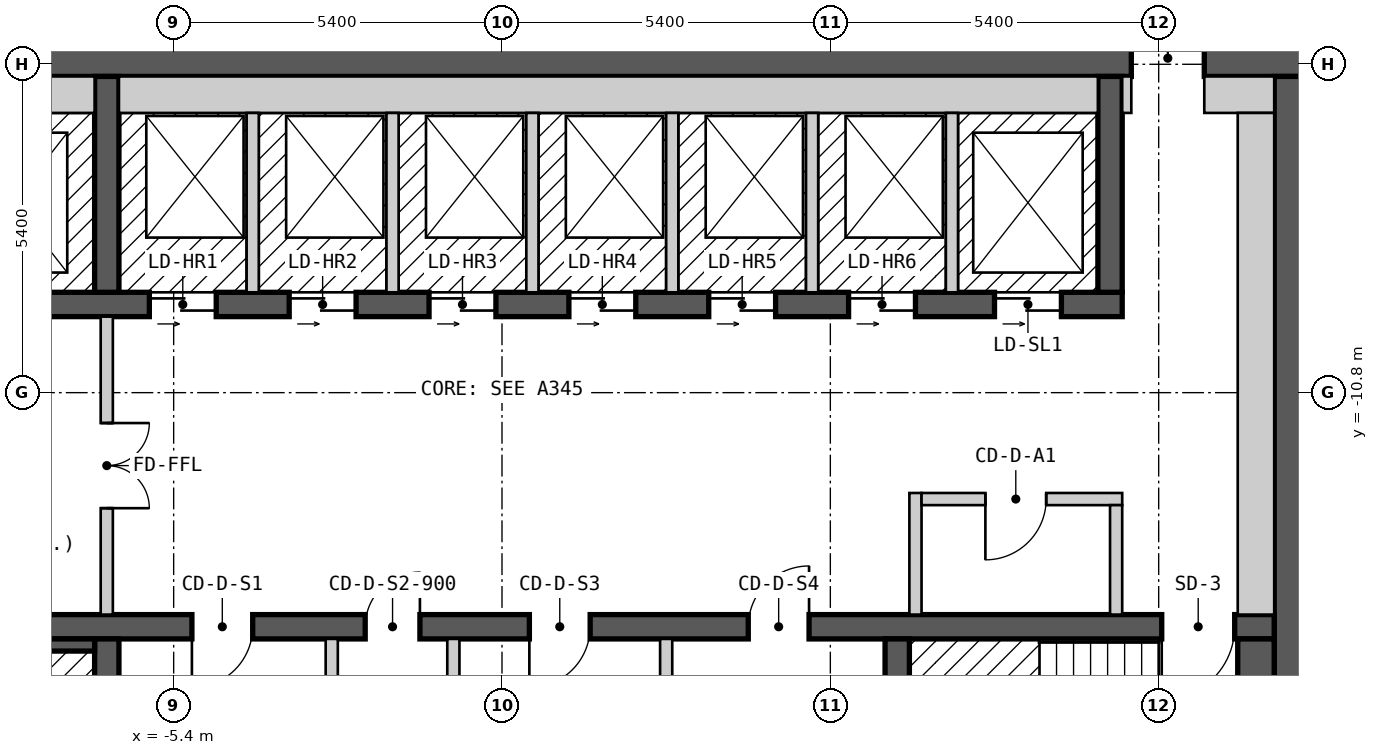
"""IFC4 building model, lengths in metres.
Left out: names, types, materials, properties, quantities, classifications, styles, units other than length and angle.
Written with IfcOpenShell. Run it as: python <this file> out.ifc"""

import sys

from ifc_helpers import new_model, si_unit, direction, frame, frame_2d, origin, place, context, subcontext, project, spatial, rectangle, extrude, element, fill, save


model = new_model("IFC4")
c1 = context("Model", 3, precision=1e-05, world=origin(), true_north=direction((0.0, 1.0)))
c2 = subcontext(c1, "Body", "Model", "MODEL_VIEW")
j1 = project(units=[si_unit("LENGTHUNIT", "METRE"), si_unit("PLANEANGLEUNIT", "RADIAN")], contexts=[c1])
p1 = place(None, origin())
s1 = spatial("IfcSite", under=j1, at=p1, CompositionType="ELEMENT")
p2 = place(p1, origin())
s2 = spatial("IfcBuilding", under=s1, at=p2, CompositionType="ELEMENT")
p3 = place(p2, frame((0.0, 0.0, 166.2)))
s3 = spatial("IfcBuildingStorey", under=s2, at=p3, CompositionType="ELEMENT", Elevation=166.2)
p4 = place(p3, frame((-13.3, -5.3, 0.0), z_axis=(0.0, 0.0, 1.0), x_axis=(1.0, 0.0, 0.0)))
e1 = element("IfcWall", 1, at=p4, inside=s3, PredefinedType="SHEAR", context=c2, shape_type="SweptSolid", body=[
    extrude(rectangle(XDim=26.6, YDim=0.6, at=frame_2d((13.3, 0.0))), origin(), (0.0, 0.0, 1.0), 2.7),
])
p5 = place(p4, frame((23.65, 0.0, 0.0)))
e2 = element("IfcOpeningElement", 2, at=p5, cuts=e1, PredefinedType="OPENING", context=c2, shape_type="SweptSolid", body=[
    extrude(rectangle(XDim=1.2, YDim=2.1, at=frame_2d((0.6, 1.05))), frame((0.0, 0.31, 0.0), z_axis=(0.0, -1.0, 0.0), x_axis=(1.0, 0.0, 0.0)), (0.0, 0.0, 1.0), 0.62),
])
p6 = place(p3, frame((13.0, -18.4, 0.0), z_axis=(0.0, 0.0, 1.0), x_axis=(0.0, 1.0, 0.0)))
e3 = element("IfcWall", 3, at=p6, inside=s3, PredefinedType="SHEAR", context=c2, shape_type="SweptSolid", body=[
    extrude(rectangle(XDim=12.8, YDim=0.6, at=frame_2d((6.4, 0.0))), origin(), (0.0, 0.0, 1.0), 2.7),
])
p7 = place(p3, frame((-12.7, -14.65, 0.0), z_axis=(0.0, 0.0, 1.0), x_axis=(1.0, 0.0, 0.0)))
e4 = element("IfcWall", 4, at=p7, inside=s3, PredefinedType="SHEAR", context=c2, shape_type="SweptSolid", body=[
    extrude(rectangle(XDim=25.4, YDim=0.4, at=frame_2d((12.7, 0.0))), origin(), (0.0, 0.0, 1.0), 2.7),
])
p8 = place(p7, frame((1.9, 0.0, 0.0), z_axis=(0.0, 0.0, 1.0), x_axis=(-1.0, 0.0, 0.0)))
e5 = element("IfcOpeningElement", 5, at=p8, cuts=e4, PredefinedType="OPENING", context=c2, shape_type="SweptSolid", body=[
    extrude(rectangle(XDim=1.2, YDim=2.1, at=frame_2d((0.6, 1.05))), frame((0.0, 0.21, 0.0), z_axis=(0.0, -1.0, 0.0), x_axis=(1.0, 0.0, 0.0)), (0.0, 0.0, 1.0), 0.42),
])
p9 = place(p7, frame((24.75, 0.0, 0.0), z_axis=(0.0, 0.0, 1.0), x_axis=(-1.0, 0.0, 0.0)))
e6 = element("IfcOpeningElement", 6, at=p9, cuts=e4, PredefinedType="OPENING", context=c2, shape_type="SweptSolid", body=[
    extrude(rectangle(XDim=1.2, YDim=2.1, at=frame_2d((0.6, 1.05))), frame((0.0, 0.21, 0.0), z_axis=(0.0, -1.0, 0.0), x_axis=(1.0, 0.0, 0.0)), (0.0, 0.0, 1.0), 0.42),
])
p10 = place(p7, frame((8.6, 0.0, 0.0), z_axis=(0.0, 0.0, 1.0), x_axis=(-1.0, 0.0, 0.0)))
e7 = element("IfcOpeningElement", 7, at=p10, cuts=e4, PredefinedType="OPENING", context=c2, shape_type="SweptSolid", body=[
    extrude(rectangle(XDim=1.0, YDim=2.1, at=frame_2d((0.5, 1.05))), frame((0.0, 0.21, 0.0), z_axis=(0.0, -1.0, 0.0), x_axis=(1.0, 0.0, 0.0)), (0.0, 0.0, 1.0), 0.42),
])
p11 = place(p7, frame((11.35, 0.0, 0.0), z_axis=(0.0, 0.0, 1.0), x_axis=(-1.0, 0.0, 0.0)))
e8 = element("IfcOpeningElement", 8, at=p11, cuts=e4, PredefinedType="OPENING", context=c2, shape_type="SweptSolid", body=[
    extrude(rectangle(XDim=0.9, YDim=2.1, at=frame_2d((0.45, 1.05))), frame((0.0, 0.21, 0.0), z_axis=(0.0, -1.0, 0.0), x_axis=(1.0, 0.0, 0.0)), (0.0, 0.0, 1.0), 0.42),
])
p12 = place(p7, frame((14.15, 0.0, 0.0), z_axis=(0.0, 0.0, 1.0), x_axis=(-1.0, 0.0, 0.0)))
e9 = element("IfcOpeningElement", 9, at=p12, cuts=e4, PredefinedType="OPENING", context=c2, shape_type="SweptSolid", body=[
    extrude(rectangle(XDim=1.0, YDim=2.1, at=frame_2d((0.5, 1.05))), frame((0.0, 0.21, 0.0), z_axis=(0.0, -1.0, 0.0), x_axis=(1.0, 0.0, 0.0)), (0.0, 0.0, 1.0), 0.42),
])
p13 = place(p7, frame((17.75, 0.0, 0.0), z_axis=(0.0, 0.0, 1.0), x_axis=(-1.0, 0.0, 0.0)))
e10 = element("IfcOpeningElement", 10, at=p13, cuts=e4, PredefinedType="OPENING", context=c2, shape_type="SweptSolid", body=[
    extrude(rectangle(XDim=1.0, YDim=2.1, at=frame_2d((0.5, 1.05))), frame((0.0, 0.21, 0.0), z_axis=(0.0, -1.0, 0.0), x_axis=(1.0, 0.0, 0.0)), (0.0, 0.0, 1.0), 0.42),
])
p14 = place(p3, frame((-12.7, -9.35, 0.0), z_axis=(0.0, 0.0, 1.0), x_axis=(1.0, 0.0, 0.0)))
e11 = element("IfcWall", 11, at=p14, inside=s3, PredefinedType="SHEAR", context=c2, shape_type="SweptSolid", body=[
    extrude(rectangle(XDim=22.9, YDim=0.4, at=frame_2d((11.45, 0.0))), origin(), (0.0, 0.0, 1.0), 2.7),
])
p15 = place(p14, frame((1.3, 0.0, 0.0)))
e12 = element("IfcOpeningElement", 12, at=p15, cuts=e11, PredefinedType="OPENING", context=c2, shape_type="SweptSolid", body=[
    extrude(rectangle(XDim=1.1, YDim=2.1, at=frame_2d((0.55, 1.05))), frame((0.0, 0.21, 0.0), z_axis=(0.0, -1.0, 0.0), x_axis=(1.0, 0.0, 0.0)), (0.0, 0.0, 1.0), 0.42),
])
p16 = place(p14, frame((4.1, 0.0, 0.0)))
e13 = element("IfcOpeningElement", 13, at=p16, cuts=e11, PredefinedType="OPENING", context=c2, shape_type="SweptSolid", body=[
    extrude(rectangle(XDim=1.1, YDim=2.1, at=frame_2d((0.55, 1.05))), frame((0.0, 0.21, 0.0), z_axis=(0.0, -1.0, 0.0), x_axis=(1.0, 0.0, 0.0)), (0.0, 0.0, 1.0), 0.42),
])
p17 = place(p14, frame((6.9, 0.0, 0.0)))
e14 = element("IfcOpeningElement", 14, at=p17, cuts=e11, PredefinedType="OPENING", context=c2, shape_type="SweptSolid", body=[
    extrude(rectangle(XDim=1.1, YDim=2.1, at=frame_2d((0.55, 1.05))), frame((0.0, 0.21, 0.0), z_axis=(0.0, -1.0, 0.0), x_axis=(1.0, 0.0, 0.0)), (0.0, 0.0, 1.0), 0.42),
])
p18 = place(p14, frame((9.2, 0.0, 0.0)))
e15 = element("IfcOpeningElement", 15, at=p18, cuts=e11, PredefinedType="OPENING", context=c2, shape_type="SweptSolid", body=[
    extrude(rectangle(XDim=1.1, YDim=2.1, at=frame_2d((0.55, 1.05))), frame((0.0, 0.21, 0.0), z_axis=(0.0, -1.0, 0.0), x_axis=(1.0, 0.0, 0.0)), (0.0, 0.0, 1.0), 0.42),
])
p19 = place(p14, frame((11.5, 0.0, 0.0)))
e16 = element("IfcOpeningElement", 16, at=p19, cuts=e11, PredefinedType="OPENING", context=c2, shape_type="SweptSolid", body=[
    extrude(rectangle(XDim=1.1, YDim=2.1, at=frame_2d((0.55, 1.05))), frame((0.0, 0.21, 0.0), z_axis=(0.0, -1.0, 0.0), x_axis=(1.0, 0.0, 0.0)), (0.0, 0.0, 1.0), 0.42),
])
p20 = place(p14, frame((13.8, 0.0, 0.0)))
e17 = element("IfcOpeningElement", 17, at=p20, cuts=e11, PredefinedType="OPENING", context=c2, shape_type="SweptSolid", body=[
    extrude(rectangle(XDim=1.1, YDim=2.1, at=frame_2d((0.55, 1.05))), frame((0.0, 0.21, 0.0), z_axis=(0.0, -1.0, 0.0), x_axis=(1.0, 0.0, 0.0)), (0.0, 0.0, 1.0), 0.42),
])
p21 = place(p14, frame((16.1, 0.0, 0.0)))
e18 = element("IfcOpeningElement", 18, at=p21, cuts=e11, PredefinedType="OPENING", context=c2, shape_type="SweptSolid", body=[
    extrude(rectangle(XDim=1.1, YDim=2.1, at=frame_2d((0.55, 1.05))), frame((0.0, 0.21, 0.0), z_axis=(0.0, -1.0, 0.0), x_axis=(1.0, 0.0, 0.0)), (0.0, 0.0, 1.0), 0.42),
])
p22 = place(p14, frame((18.4, 0.0, 0.0)))
e19 = element("IfcOpeningElement", 19, at=p22, cuts=e11, PredefinedType="OPENING", context=c2, shape_type="SweptSolid", body=[
    extrude(rectangle(XDim=1.1, YDim=2.1, at=frame_2d((0.55, 1.05))), frame((0.0, 0.21, 0.0), z_axis=(0.0, -1.0, 0.0), x_axis=(1.0, 0.0, 0.0)), (0.0, 0.0, 1.0), 0.42),
])
p23 = place(p14, frame((20.8, 0.0, 0.0)))
e20 = element("IfcOpeningElement", 20, at=p23, cuts=e11, PredefinedType="OPENING", context=c2, shape_type="SweptSolid", body=[
    extrude(rectangle(XDim=1.1, YDim=2.1, at=frame_2d((0.55, 1.05))), frame((0.0, 0.21, 0.0), z_axis=(0.0, -1.0, 0.0), x_axis=(1.0, 0.0, 0.0)), (0.0, 0.0, 1.0), 0.42),
])
for number, where, z_axis, x_axis in (
    (21, (-6.5, -18.4, 0.0), (0.0, 0.0, 1.0), (0.0, 1.0, 0.0)),
    (22, (6.5, -18.4, 0.0), (0.0, 0.0, 1.0), (0.0, 1.0, 0.0)),
    (23, (-6.5, -9.15, 0.0), (0.0, 0.0, 1.0), (0.0, 1.0, 0.0)),
    (24, (10.0, -9.15, 0.0), (0.0, 0.0, 1.0), (0.0, 1.0, 0.0)),
):
    element("IfcWall", number, at=place(p3, frame(where, z_axis=z_axis, x_axis=x_axis)), inside=s3, PredefinedType="SHEAR", context=c2, shape_type="SweptSolid", body=[
        extrude(rectangle(XDim=3.55, YDim=0.4, at=frame_2d((1.775, 0.0))), origin(), (0.0, 0.0, 1.0), 2.7),
    ])
p24 = place(p3, frame((-12.1, -5.9, 0.0), z_axis=(0.0, 0.0, 1.0), x_axis=(1.0, 0.0, 0.0)))
e25 = element("IfcWall", 25, at=p24, inside=s3, PredefinedType="SOLIDWALL", context=c2, shape_type="SweptSolid", body=[
    extrude(rectangle(XDim=5.4, YDim=0.6, at=frame_2d((2.7, 0.0))), origin(), (0.0, 0.0, 1.0), 2.7),
])
p25 = place(p3, frame((-10.8, -14.95, 0.0), z_axis=(0.0, 0.0, 1.0), x_axis=(1.0, 0.0, 0.0)))
e26 = element("IfcWall", 26, at=p25, inside=s3, PredefinedType="SOLIDWALL", context=c2, shape_type="SweptSolid", body=[
    extrude(rectangle(XDim=4.1, YDim=0.2, at=frame_2d((2.05, 0.0))), origin(), (0.0, 0.0, 1.0), 2.7),
])
p26 = place(p3, frame((-6.5, -14.45, 0.0), z_axis=(0.0, 0.0, 1.0), x_axis=(0.0, 1.0, 0.0)))
e27 = element("IfcWall", 27, at=p26, inside=s3, PredefinedType="PARTITIONING", context=c2, shape_type="SweptSolid", body=[
    extrude(rectangle(XDim=4.9, YDim=0.2, at=frame_2d((2.45, 0.0))), origin(), (0.0, 0.0, 1.0), 2.7),
])
p27 = place(p26, frame((3.15, 0.0, 0.0), z_axis=(0.0, 0.0, 1.0), x_axis=(-1.0, 0.0, 0.0)))
e28 = element("IfcOpeningElement", 28, at=p27, cuts=e27, PredefinedType="OPENING", context=c2, shape_type="SweptSolid", body=[
    extrude(rectangle(XDim=1.4, YDim=2.1, at=frame_2d((0.7, 1.05))), frame((0.0, 0.11, 0.0), z_axis=(0.0, -1.0, 0.0), x_axis=(1.0, 0.0, 0.0)), (0.0, 0.0, 1.0), 0.22),
])
p28 = place(p3, frame((-6.3, -5.9, 0.0), z_axis=(0.0, 0.0, 1.0), x_axis=(1.0, 0.0, 0.0)))
e29 = element("IfcWall", 29, at=p28, inside=s3, PredefinedType="SOLIDWALL", context=c2, shape_type="SweptSolid", body=[
    extrude(rectangle(XDim=16.1, YDim=0.6, at=frame_2d((8.05, 0.0))), origin(), (0.0, 0.0, 1.0), 2.7),
])
p29 = place(p3, frame((-4.1, -9.15, 0.0), z_axis=(0.0, 0.0, 1.0), x_axis=(0.0, 1.0, 0.0)))
e30 = element("IfcWall", 30, at=p29, inside=s3, PredefinedType="SOLIDWALL", context=c2, shape_type="SweptSolid", body=[
    extrude(rectangle(XDim=2.95, YDim=0.2, at=frame_2d((1.475, 0.0))), origin(), (0.0, 0.0, 1.0), 2.7),
])
p30 = place(p3, frame((-2.8, -17.8, 0.0), z_axis=(0.0, 0.0, 1.0), x_axis=(0.0, 1.0, 0.0)))
e31 = element("IfcWall", 31, at=p30, inside=s3, PredefinedType="PARTITIONING", context=c2, shape_type="SweptSolid", body=[
    extrude(rectangle(XDim=2.95, YDim=0.2, at=frame_2d((1.475, 0.0))), origin(), (0.0, 0.0, 1.0), 2.7),
])
p31 = place(p3, frame((-1.8, -9.15, 0.0), z_axis=(0.0, 0.0, 1.0), x_axis=(0.0, 1.0, 0.0)))
e32 = element("IfcWall", 32, at=p31, inside=s3, PredefinedType="SOLIDWALL", context=c2, shape_type="SweptSolid", body=[
    extrude(rectangle(XDim=2.95, YDim=0.2, at=frame_2d((1.475, 0.0))), origin(), (0.0, 0.0, 1.0), 2.7),
])
p32 = place(p3, frame((-0.8, -17.8, 0.0), z_axis=(0.0, 0.0, 1.0), x_axis=(0.0, 1.0, 0.0)))
e33 = element("IfcWall", 33, at=p32, inside=s3, PredefinedType="PARTITIONING", context=c2, shape_type="SweptSolid", body=[
    extrude(rectangle(XDim=2.95, YDim=0.2, at=frame_2d((1.475, 0.0))), origin(), (0.0, 0.0, 1.0), 2.7),
])
p33 = place(p3, frame((0.5, -9.15, 0.0), z_axis=(0.0, 0.0, 1.0), x_axis=(0.0, 1.0, 0.0)))
e34 = element("IfcWall", 34, at=p33, inside=s3, PredefinedType="SOLIDWALL", context=c2, shape_type="SweptSolid", body=[
    extrude(rectangle(XDim=2.95, YDim=0.2, at=frame_2d((1.475, 0.0))), origin(), (0.0, 0.0, 1.0), 2.7),
])
p34 = place(p3, frame((2.7, -17.8, 0.0), z_axis=(0.0, 0.0, 1.0), x_axis=(0.0, 1.0, 0.0)))
e35 = element("IfcWall", 35, at=p34, inside=s3, PredefinedType="PARTITIONING", context=c2, shape_type="SweptSolid", body=[
    extrude(rectangle(XDim=2.95, YDim=0.2, at=frame_2d((1.475, 0.0))), origin(), (0.0, 0.0, 1.0), 2.7),
])
for number, where, z_axis, x_axis in (
    (36, (2.8, -9.15, 0.0), (0.0, 0.0, 1.0), (0.0, 1.0, 0.0)),
    (37, (5.1, -9.15, 0.0), (0.0, 0.0, 1.0), (0.0, 1.0, 0.0)),
):
    element("IfcWall", number, at=place(p3, frame(where, z_axis=z_axis, x_axis=x_axis)), inside=s3, PredefinedType="SOLIDWALL", context=c2, shape_type="SweptSolid", body=[
        extrude(rectangle(XDim=2.95, YDim=0.2, at=frame_2d((1.475, 0.0))), origin(), (0.0, 0.0, 1.0), 2.7),
    ])
p35 = place(p3, frame((6.8, -14.45, 0.0), z_axis=(0.0, 0.0, 1.0), x_axis=(0.0, 1.0, 0.0)))
e38 = element("IfcWall", 38, at=p35, inside=s3, PredefinedType="PARTITIONING", context=c2, shape_type="SweptSolid", body=[
    extrude(rectangle(XDim=2.0, YDim=0.2, at=frame_2d((1.0, 0.0))), origin(), (0.0, 0.0, 1.0), 2.7),
])
p36 = place(p3, frame((6.9, -12.55, 0.0), z_axis=(0.0, 0.0, 1.0), x_axis=(1.0, 0.0, 0.0)))
e39 = element("IfcWall", 39, at=p36, inside=s3, PredefinedType="PARTITIONING", context=c2, shape_type="SweptSolid", body=[
    extrude(rectangle(XDim=3.3, YDim=0.2, at=frame_2d((1.65, 0.0))), origin(), (0.0, 0.0, 1.0), 2.7),
])
p37 = place(p36, frame((2.05, 0.0, 0.0), z_axis=(0.0, 0.0, 1.0), x_axis=(-1.0, 0.0, 0.0)))
e40 = element("IfcOpeningElement", 40, at=p37, cuts=e39, PredefinedType="OPENING", context=c2, shape_type="SweptSolid", body=[
    extrude(rectangle(XDim=1.0, YDim=2.1, at=frame_2d((0.5, 1.05))), frame((0.0, 0.11, 0.0), z_axis=(0.0, -1.0, 0.0), x_axis=(1.0, 0.0, 0.0)), (0.0, 0.0, 1.0), 0.22),
])
p38 = place(p3, frame((7.4, -9.15, 0.0), z_axis=(0.0, 0.0, 1.0), x_axis=(0.0, 1.0, 0.0)))
e41 = element("IfcWall", 41, at=p38, inside=s3, PredefinedType="SOLIDWALL", context=c2, shape_type="SweptSolid", body=[
    extrude(rectangle(XDim=2.95, YDim=0.2, at=frame_2d((1.475, 0.0))), origin(), (0.0, 0.0, 1.0), 2.7),
])
p39 = place(p3, frame((10.1, -14.45, 0.0), z_axis=(0.0, 0.0, 1.0), x_axis=(0.0, 1.0, 0.0)))
e42 = element("IfcWall", 42, at=p39, inside=s3, PredefinedType="PARTITIONING", context=c2, shape_type="SweptSolid", body=[
    extrude(rectangle(XDim=1.8, YDim=0.2, at=frame_2d((0.9, 0.0))), origin(), (0.0, 0.0, 1.0), 2.7),
])
p40 = place(p3, frame((10.275, -6.2, 0.0), z_axis=(0.0, 0.0, 1.0), x_axis=(0.0, 1.0, 0.0)))
e43 = element("IfcWall", 43, at=p40, inside=s3, PredefinedType="PARTITIONING", context=c2, shape_type="SweptSolid", body=[
    extrude(rectangle(XDim=0.6, YDim=0.15, at=frame_2d((0.3, 0.0))), origin(), (0.0, 0.0, 1.0), 2.7),
])
p41 = place(p3, frame((11.55, -5.9, 0.0), z_axis=(0.0, 0.0, 1.0), x_axis=(1.0, 0.0, 0.0)))
e44 = element("IfcWall", 44, at=p41, inside=s3, PredefinedType="PARTITIONING", context=c2, shape_type="SweptSolid", body=[
    extrude(rectangle(XDim=1.15, YDim=0.6, at=frame_2d((0.575, 0.0))), origin(), (0.0, 0.0, 1.0), 2.7),
])
p42 = place(p3, frame((12.4, -17.6, 0.0), z_axis=(0.0, 0.0, 1.0), x_axis=(0.0, 1.0, 0.0)))
e45 = element("IfcWall", 45, at=p42, inside=s3, PredefinedType="SOLIDWALL", context=c2, shape_type="SweptSolid", body=[
    extrude(rectangle(XDim=2.75, YDim=0.6, at=frame_2d((1.375, 0.0))), origin(), (0.0, 0.0, 1.0), 2.7),
])
p43 = place(p3, frame((12.4, -14.45, 0.0), z_axis=(0.0, 0.0, 1.0), x_axis=(0.0, 1.0, 0.0)))
e46 = element("IfcWall", 46, at=p43, inside=s3, PredefinedType="PARTITIONING", context=c2, shape_type="SweptSolid", body=[
    extrude(rectangle(XDim=8.25, YDim=0.6, at=frame_2d((4.125, 0.0))), origin(), (0.0, 0.0, 1.0), 2.7),
])
p44 = place(p17, origin())
e47 = element("IfcDoor", 47, at=p44, inside=s3, OperationType="DOUBLE_DOOR_SLIDING", PredefinedType="DOOR", context=c2, shape_type="SweptSolid", body=[
    extrude(rectangle(XDim=1.1, YDim=2.1, at=frame_2d((0.55, 1.05))), frame((0.0, 0.025, 0.0), z_axis=(0.0, -1.0, 0.0), x_axis=(1.0, 0.0, 0.0)), (0.0, 0.0, 1.0), 0.05),
])
fill(e14, e47)
p45 = place(p18, origin())
e48 = element("IfcDoor", 48, at=p45, inside=s3, OperationType="DOUBLE_DOOR_SLIDING", PredefinedType="DOOR", context=c2, shape_type="SweptSolid", body=[
    extrude(rectangle(XDim=1.1, YDim=2.1, at=frame_2d((0.55, 1.05))), frame((0.0, 0.025, 0.0), z_axis=(0.0, -1.0, 0.0), x_axis=(1.0, 0.0, 0.0)), (0.0, 0.0, 1.0), 0.05),
])
fill(e15, e48)
p46 = place(p19, origin())
e49 = element("IfcDoor", 49, at=p46, inside=s3, OperationType="DOUBLE_DOOR_SLIDING", PredefinedType="DOOR", context=c2, shape_type="SweptSolid", body=[
    extrude(rectangle(XDim=1.1, YDim=2.1, at=frame_2d((0.55, 1.05))), frame((0.0, 0.025, 0.0), z_axis=(0.0, -1.0, 0.0), x_axis=(1.0, 0.0, 0.0)), (0.0, 0.0, 1.0), 0.05),
])
fill(e16, e49)
p47 = place(p20, origin())
e50 = element("IfcDoor", 50, at=p47, inside=s3, OperationType="DOUBLE_DOOR_SLIDING", PredefinedType="DOOR", context=c2, shape_type="SweptSolid", body=[
    extrude(rectangle(XDim=1.1, YDim=2.1, at=frame_2d((0.55, 1.05))), frame((0.0, 0.025, 0.0), z_axis=(0.0, -1.0, 0.0), x_axis=(1.0, 0.0, 0.0)), (0.0, 0.0, 1.0), 0.05),
])
fill(e17, e50)
p48 = place(p21, origin())
e51 = element("IfcDoor", 51, at=p48, inside=s3, OperationType="DOUBLE_DOOR_SLIDING", PredefinedType="DOOR", context=c2, shape_type="SweptSolid", body=[
    extrude(rectangle(XDim=1.1, YDim=2.1, at=frame_2d((0.55, 1.05))), frame((0.0, 0.025, 0.0), z_axis=(0.0, -1.0, 0.0), x_axis=(1.0, 0.0, 0.0)), (0.0, 0.0, 1.0), 0.05),
])
fill(e18, e51)
p49 = place(p22, origin())
e52 = element("IfcDoor", 52, at=p49, inside=s3, OperationType="DOUBLE_DOOR_SLIDING", PredefinedType="DOOR", context=c2, shape_type="SweptSolid", body=[
    extrude(rectangle(XDim=1.1, YDim=2.1, at=frame_2d((0.55, 1.05))), frame((0.0, 0.025, 0.0), z_axis=(0.0, -1.0, 0.0), x_axis=(1.0, 0.0, 0.0)), (0.0, 0.0, 1.0), 0.05),
])
fill(e19, e52)
p50 = place(p23, origin())
e53 = element("IfcDoor", 53, at=p50, inside=s3, OperationType="DOUBLE_DOOR_SLIDING", PredefinedType="DOOR", context=c2, shape_type="SweptSolid", body=[
    extrude(rectangle(XDim=1.1, YDim=2.1, at=frame_2d((0.55, 1.05))), frame((0.0, 0.025, 0.0), z_axis=(0.0, -1.0, 0.0), x_axis=(1.0, 0.0, 0.0)), (0.0, 0.0, 1.0), 0.05),
])
fill(e20, e53)
p51 = place(p9, origin())
e54 = element("IfcDoor", 54, at=p51, inside=s3, OperationType="SINGLE_SWING_RIGHT", PredefinedType="DOOR", context=c2, shape_type="SweptSolid", body=[
    extrude(rectangle(XDim=1.2, YDim=2.1, at=frame_2d((0.6, 1.05))), frame((0.0, 0.025, 0.0), z_axis=(0.0, -1.0, 0.0), x_axis=(1.0, 0.0, 0.0)), (0.0, 0.0, 1.0), 0.05),
])
fill(e6, e54)
p52 = place(p27, origin())
e55 = element("IfcDoor", 55, at=p52, inside=s3, OperationType="DOUBLE_DOOR_SINGLE_SWING", PredefinedType="DOOR", context=c2, shape_type="SweptSolid", body=[
    extrude(rectangle(XDim=1.4, YDim=2.1, at=frame_2d((0.7, 1.05))), frame((0.0, 0.025, 0.0), z_axis=(0.0, -1.0, 0.0), x_axis=(1.0, 0.0, 0.0)), (0.0, 0.0, 1.0), 0.05),
])
fill(e28, e55)
p53 = place(p5, origin())
e56 = element("IfcDoor", 56, at=p53, inside=s3, OperationType="DOUBLE_DOOR_SINGLE_SWING", PredefinedType="DOOR", context=c2, shape_type="SweptSolid", body=[
    extrude(rectangle(XDim=1.2, YDim=2.1, at=frame_2d((0.6, 1.05))), frame((0.0, 0.025, 0.0), z_axis=(0.0, -1.0, 0.0), x_axis=(1.0, 0.0, 0.0)), (0.0, 0.0, 1.0), 0.05),
])
fill(e2, e56)
p54 = place(p37, origin())
e57 = element("IfcDoor", 57, at=p54, inside=s3, OperationType="SINGLE_SWING_RIGHT", PredefinedType="DOOR", context=c2, shape_type="SweptSolid", body=[
    extrude(rectangle(XDim=1.0, YDim=2.1, at=frame_2d((0.5, 1.05))), frame((0.0, 0.025, 0.0), z_axis=(0.0, -1.0, 0.0), x_axis=(1.0, 0.0, 0.0)), (0.0, 0.0, 1.0), 0.05),
])
fill(e40, e57)
p55 = place(p10, origin())
e58 = element("IfcDoor", 58, at=p55, inside=s3, OperationType="SINGLE_SWING_RIGHT", PredefinedType="DOOR", context=c2, shape_type="SweptSolid", body=[
    extrude(rectangle(XDim=1.0, YDim=2.1, at=frame_2d((0.5, 1.05))), frame((0.0, 0.025, 0.0), z_axis=(0.0, -1.0, 0.0), x_axis=(1.0, 0.0, 0.0)), (0.0, 0.0, 1.0), 0.05),
])
fill(e7, e58)
p56 = place(p11, origin())
e59 = element("IfcDoor", 59, at=p56, inside=s3, OperationType="SINGLE_SWING_LEFT", PredefinedType="DOOR", context=c2, shape_type="SweptSolid", body=[
    extrude(rectangle(XDim=0.9, YDim=2.1, at=frame_2d((0.45, 1.05))), frame((0.0, 0.025, 0.0), z_axis=(0.0, -1.0, 0.0), x_axis=(1.0, 0.0, 0.0)), (0.0, 0.0, 1.0), 0.05),
])
fill(e8, e59)
p57 = place(p12, origin())
e60 = element("IfcDoor", 60, at=p57, inside=s3, OperationType="SINGLE_SWING_RIGHT", PredefinedType="DOOR", context=c2, shape_type="SweptSolid", body=[
    extrude(rectangle(XDim=1.0, YDim=2.1, at=frame_2d((0.5, 1.05))), frame((0.0, 0.025, 0.0), z_axis=(0.0, -1.0, 0.0), x_axis=(1.0, 0.0, 0.0)), (0.0, 0.0, 1.0), 0.05),
])
fill(e9, e60)
p58 = place(p13, origin())
e61 = element("IfcDoor", 61, at=p58, inside=s3, OperationType="SINGLE_SWING_LEFT", PredefinedType="DOOR", context=c2, shape_type="SweptSolid", body=[
    extrude(rectangle(XDim=1.0, YDim=2.1, at=frame_2d((0.5, 1.05))), frame((0.0, 0.025, 0.0), z_axis=(0.0, -1.0, 0.0), x_axis=(1.0, 0.0, 0.0)), (0.0, 0.0, 1.0), 0.05),
])
fill(e10, e61)
save(model, sys.argv[1])
